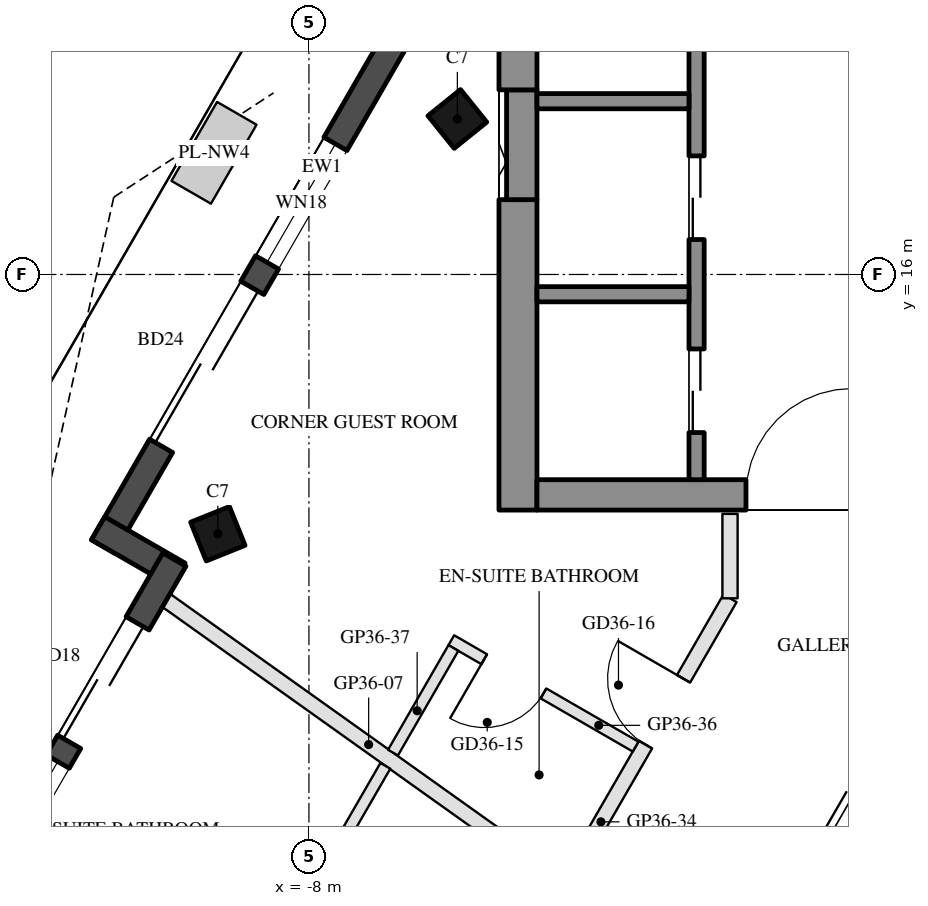
"""IFC4 building model, lengths in metres.
Left out: names, types, materials, properties, quantities, classifications, styles, units other than length and angle.
Written with IfcOpenShell. Run it as: python <this file> out.ifc"""

import sys

from ifc_helpers import new_model, si_unit, direction, frame, frame_2d, origin, origin_2d, place, context, subcontext, project, spatial, rectangle, hollow_rectangle, extrude, boolean, halfspace, element, fill, save


model = new_model("IFC4")
c1 = context("Model", 3, precision=1e-05, world=origin(), true_north=direction((0.0, 1.0)))
c2 = subcontext(c1, "Body", "Model", "MODEL_VIEW")
j1 = project(units=[si_unit("LENGTHUNIT", "METRE"), si_unit("PLANEANGLEUNIT", "RADIAN")], contexts=[c1])
p1 = place(None, origin())
s1 = spatial("IfcSite", under=j1, at=p1, CompositionType="ELEMENT")
p2 = place(p1, origin())
s2 = spatial("IfcBuilding", under=s1, at=p2, CompositionType="ELEMENT")
p3 = place(p2, frame((0.0, 0.0, 328.1)))
s3 = spatial("IfcBuildingStorey", under=s2, at=p3, CompositionType="ELEMENT", Elevation=328.1)
p4 = place(p3, frame((-6.047, 18.046, 0.0), z_axis=(0.069728397733, -0.180050765176, 0.981182792608), x_axis=(0.504276986778, 0.855013934028, 0.12106152661)))
e1 = element("IfcColumn", 1, at=p4, inside=s3, PredefinedType="COLUMN", context=c2, shape_type="SweptSolid", body=[
    boolean("DIFFERENCE", boolean("DIFFERENCE", extrude(hollow_rectangle(XDim=0.55, YDim=0.55, WallThickness=0.025, at=origin_2d()), origin(), (0.0, 0.0, 1.0), 3.771), halfspace(frame((0.0, 0.0, 0.04), z_axis=(0.0, 0.0, 1.0), x_axis=(1.0, 0.0, 0.0)), True)), halfspace(frame((0.0, 0.0, 3.753), z_axis=(0.0, 0.0, 1.0), x_axis=(1.0, 0.0, 0.0)), False)),
])
p5 = place(p3, frame((-9.198, 12.588, 0.0), z_axis=(0.100518021011, -0.128316722417, 0.98662604172), x_axis=(0.503129383785, 0.862065632243, 0.060857775822)))
e2 = element("IfcColumn", 2, at=p5, inside=s3, PredefinedType="COLUMN", context=c2, shape_type="SweptSolid", body=[
    boolean("DIFFERENCE", boolean("DIFFERENCE", extrude(hollow_rectangle(XDim=0.55, YDim=0.55, WallThickness=0.025, at=origin_2d()), origin(), (0.0, 0.0, 1.0), 3.75), halfspace(frame((0.0, 0.0, 0.034), z_axis=(0.0, 0.0, 1.0), x_axis=(1.0, 0.0, 0.0)), True)), halfspace(frame((0.0, 0.0, 3.735), z_axis=(0.0, 0.0, 1.0), x_axis=(1.0, 0.0, 0.0)), False)),
])
p6 = place(p3, frame((-5.905, 20.742, 0.0), z_axis=(0.0, 0.0, 1.0), x_axis=(-0.500003254449, -0.866023524819, 0.0)))
e3 = element("IfcWall", 3, at=p6, inside=s3, PredefinedType="SOLIDWALL", context=c2, shape_type="SweptSolid", body=[
    extrude(rectangle(XDim=9.608, YDim=0.35, at=frame_2d((4.804, 0.0))), origin(), (0.0, 0.0, 1.0), 3.45),
])
p7 = place(p6, frame((0.45, 0.0, 0.3)))
e4 = element("IfcOpeningElement", 4, at=p7, cuts=e3, PredefinedType="OPENING", context=c2, shape_type="SweptSolid", body=[
    extrude(rectangle(XDim=1.4, YDim=2.65, at=frame_2d((0.7, 1.325))), frame((0.0, 0.185, 0.0), z_axis=(0.0, -1.0, 0.0), x_axis=(1.0, 0.0, 0.0)), (0.0, 0.0, 1.0), 0.37),
])
p8 = place(p6, frame((5.68, 0.0, 0.0)))
e5 = element("IfcOpeningElement", 5, at=p8, cuts=e3, PredefinedType="OPENING", context=c2, shape_type="SweptSolid", body=[
    extrude(rectangle(XDim=2.4, YDim=2.4, at=frame_2d((1.2, 1.2))), frame((0.0, 0.185, 0.0), z_axis=(0.0, -1.0, 0.0), x_axis=(1.0, 0.0, 0.0)), (0.0, 0.0, 1.0), 0.37),
])
p9 = place(p6, frame((3.492, 0.0, 0.3)))
e6 = element("IfcOpeningElement", 6, at=p9, cuts=e3, PredefinedType="OPENING", context=c2, shape_type="SweptSolid", body=[
    extrude(rectangle(XDim=1.8, YDim=2.65, at=frame_2d((0.9, 1.325))), frame((0.0, 0.185, 0.0), z_axis=(0.0, -1.0, 0.0), x_axis=(1.0, 0.0, 0.0)), (0.0, 0.0, 1.0), 0.37),
])
p10 = place(p3, frame((-10.774, 12.66, 0.0), z_axis=(0.0, 0.0, 1.0), x_axis=(0.866142280446, -0.499797509021, 0.0)))
e7 = element("IfcWall", 7, at=p10, inside=s3, PredefinedType="SOLIDWALL", context=c2, shape_type="SweptSolid", body=[
    extrude(rectangle(XDim=1.22, YDim=0.35, at=frame_2d((0.61, 0.0))), origin(), (0.0, 0.0, 1.0), 3.45),
])
p11 = place(p3, frame((-9.77, 12.249, 0.0), z_axis=(0.0, 0.0, 1.0), x_axis=(-0.499999159329, -0.866025889145, 0.0)))
e8 = element("IfcWall", 8, at=p11, inside=s3, PredefinedType="SOLIDWALL", context=c2, shape_type="SweptSolid", body=[
    extrude(rectangle(XDim=5.143, YDim=0.35, at=frame_2d((2.571, 0.0))), origin(), (0.0, 0.0, 1.0), 3.45),
])
p12 = place(p11, frame((0.969, 0.0, 0.0)))
e9 = element("IfcOpeningElement", 9, at=p12, cuts=e8, PredefinedType="OPENING", context=c2, shape_type="SweptSolid", body=[
    extrude(rectangle(XDim=1.8, YDim=2.4, at=frame_2d((0.9, 1.2))), frame((0.0, 0.185, 0.0), z_axis=(0.0, -1.0, 0.0), x_axis=(1.0, 0.0, 0.0)), (0.0, 0.0, 1.0), 0.37),
])
p13 = place(p11, frame((3.069, 0.0, 0.3)))
e10 = element("IfcOpeningElement", 10, at=p13, cuts=e8, PredefinedType="OPENING", context=c2, shape_type="SweptSolid", body=[
    extrude(rectangle(XDim=1.7, YDim=2.65, at=frame_2d((0.85, 1.325))), frame((0.0, 0.185, 0.0), z_axis=(0.0, -1.0, 0.0), x_axis=(1.0, 0.0, 0.0)), (0.0, 0.0, 1.0), 0.37),
])
p14 = place(p3, frame((-5.25, 12.9, 0.0), z_axis=(0.0, 0.0, 1.0), x_axis=(0.0, 1.0, 0.0)))
e11 = element("IfcWall", 11, at=p14, inside=s3, PredefinedType="SHEAR", context=c2, shape_type="SweptSolid", body=[
    extrude(rectangle(XDim=4.085, YDim=0.5, at=frame_2d((2.042, 0.0))), origin(), (0.0, 0.0, 1.0), 3.45),
])
p15 = place(p3, frame((-5.2, 16.985, 0.0), z_axis=(0.0, 0.0, 1.0), x_axis=(0.0, 1.0, 0.0)))
e12 = element("IfcWall", 12, at=p15, inside=s3, PredefinedType="SHEAR", context=c2, shape_type="SweptSolid", body=[
    extrude(rectangle(XDim=1.445, YDim=0.4, at=frame_2d((0.722, 0.0))), origin(), (0.0, 0.0, 1.0), 3.45),
])
p16 = place(p3, frame((-5.25, 18.429, 0.0), z_axis=(0.0, 0.0, 1.0), x_axis=(0.0, 1.0, 0.0)))
e13 = element("IfcWall", 13, at=p16, inside=s3, PredefinedType="SHEAR", context=c2, shape_type="SweptSolid", body=[
    extrude(rectangle(XDim=2.738, YDim=0.5, at=frame_2d((1.369, 0.0))), origin(), (0.0, 0.0, 1.0), 3.45),
])
p17 = place(p3, frame((5.0, 13.1, 0.0), z_axis=(0.0, 0.0, 1.0), x_axis=(-1.0, 0.0, 0.0)))
e14 = element("IfcWall", 14, at=p17, inside=s3, PredefinedType="SHEAR", context=c2, shape_type="SweptSolid", body=[
    extrude(rectangle(XDim=10.0, YDim=0.4, at=frame_2d((5.0, 0.0))), origin(), (0.0, 0.0, 1.0), 3.45),
])
p18 = place(p17, frame((3.55, 0.0, 0.0)))
e15 = element("IfcOpeningElement", 15, at=p18, cuts=e14, PredefinedType="OPENING", context=c2, shape_type="SweptSolid", body=[
    extrude(rectangle(XDim=1.1, YDim=2.1, at=frame_2d((0.55, 1.05))), frame((0.0, 0.21, 0.0), z_axis=(0.0, -1.0, 0.0), x_axis=(1.0, 0.0, 0.0)), (0.0, 0.0, 1.0), 0.42),
])
p19 = place(p17, frame((5.85, 0.0, 0.0)))
e16 = element("IfcOpeningElement", 16, at=p19, cuts=e14, PredefinedType="OPENING", context=c2, shape_type="SweptSolid", body=[
    extrude(rectangle(XDim=1.4, YDim=2.1, at=frame_2d((0.7, 1.05))), frame((0.0, 0.21, 0.0), z_axis=(0.0, -1.0, 0.0), x_axis=(1.0, 0.0, 0.0)), (0.0, 0.0, 1.0), 0.42),
])
p20 = place(p3, frame((-2.9, 13.3, 0.0), z_axis=(0.0, 0.0, 1.0), x_axis=(0.0, 1.0, 0.0)))
e17 = element("IfcWall", 17, at=p20, inside=s3, PredefinedType="SHEAR", context=c2, shape_type="SweptSolid", body=[
    extrude(rectangle(XDim=9.273, YDim=0.2, at=frame_2d((4.636, 0.0))), origin(), (0.0, 0.0, 1.0), 3.45),
])
p21 = place(p20, frame((0.62, 0.0, 0.0)))
e18 = element("IfcOpeningElement", 18, at=p21, cuts=e17, PredefinedType="OPENING", context=c2, shape_type="SweptSolid", body=[
    extrude(rectangle(XDim=1.1, YDim=2.1, at=frame_2d((0.55, 1.05))), frame((0.0, 0.11, 0.0), z_axis=(0.0, -1.0, 0.0), x_axis=(1.0, 0.0, 0.0)), (0.0, 0.0, 1.0), 0.22),
])
p22 = place(p20, frame((3.16, 0.0, 0.0)))
e19 = element("IfcOpeningElement", 19, at=p22, cuts=e17, PredefinedType="OPENING", context=c2, shape_type="SweptSolid", body=[
    extrude(rectangle(XDim=1.1, YDim=2.1, at=frame_2d((0.55, 1.05))), frame((0.0, 0.11, 0.0), z_axis=(0.0, -1.0, 0.0), x_axis=(1.0, 0.0, 0.0)), (0.0, 0.0, 1.0), 0.22),
])
p23 = place(p20, frame((5.7, 0.0, 0.0)))
e20 = element("IfcOpeningElement", 20, at=p23, cuts=e17, PredefinedType="OPENING", context=c2, shape_type="SweptSolid", body=[
    extrude(rectangle(XDim=1.1, YDim=2.1, at=frame_2d((0.55, 1.05))), frame((0.0, 0.11, 0.0), z_axis=(0.0, -1.0, 0.0), x_axis=(1.0, 0.0, 0.0)), (0.0, 0.0, 1.0), 0.22),
])
for number, where, z_axis, x_axis in (
    (21, (-3.0, 15.74, 0.0), (0.0, 0.0, 1.0), (-1.0, 0.0, 0.0)),
    (22, (-3.0, 18.28, 0.0), (0.0, 0.0, 1.0), (-1.0, 0.0, 0.0)),
):
    element("IfcWall", number, at=place(p3, frame(where, z_axis=z_axis, x_axis=x_axis)), inside=s3, PredefinedType="SHEAR", context=c2, shape_type="SweptSolid", body=[
        extrude(rectangle(XDim=2.0, YDim=0.2, at=frame_2d((1.0, 0.0))), origin(), (0.0, 0.0, 1.0), 3.45),
    ])
p24 = place(p3, frame((-9.878, 11.712, 0.0), z_axis=(0.0, 0.0, 1.0), x_axis=(0.814431562196, -0.580259623357, 0.0)))
e23 = element("IfcWall", 23, at=p24, inside=s3, PredefinedType="PARTITIONING", context=c2, shape_type="SweptSolid", body=[
    extrude(rectangle(XDim=6.54, YDim=0.2, at=frame_2d((3.27, 0.0))), origin(), (0.0, 0.0, 1.0), 3.05),
])
p25 = place(p3, frame((-4.583, 8.062, 0.0), z_axis=(0.0, 0.0, 1.0), x_axis=(0.50000452617, 0.866022790583, 0.0)))
e24 = element("IfcWall", 24, at=p25, inside=s3, PredefinedType="PARTITIONING", context=c2, shape_type="SweptSolid", body=[
    extrude(rectangle(XDim=4.246, YDim=0.2, at=frame_2d((2.123, 0.0))), origin(), (0.0, 0.0, 1.0), 3.05),
])
p26 = place(p25, frame((2.023, 0.0, 0.0)))
e25 = element("IfcOpeningElement", 25, at=p26, cuts=e24, PredefinedType="OPENING", context=c2, shape_type="SweptSolid", body=[
    extrude(rectangle(XDim=1.0, YDim=2.1, at=frame_2d((0.5, 1.05))), frame((0.0, 0.11, 0.0), z_axis=(0.0, -1.0, 0.0), x_axis=(1.0, 0.0, 0.0)), (0.0, 0.0, 1.0), 0.22),
])
p27 = place(p3, frame((-2.46, 11.739, 0.0), z_axis=(0.0, 0.0, 1.0), x_axis=(0.0, 1.0, 0.0)))
e26 = element("IfcWall", 26, at=p27, inside=s3, PredefinedType="PARTITIONING", context=c2, shape_type="SweptSolid", body=[
    extrude(rectangle(XDim=1.111, YDim=0.2, at=frame_2d((0.555, 0.0))), origin(), (0.0, 0.0, 1.0), 3.45),
])
p28 = place(p3, frame((-3.702, 9.788, 0.0), z_axis=(0.0, 0.0, 1.0), x_axis=(-0.866034573852, 0.49998411664, 0.0)))
e27 = element("IfcWall", 27, at=p28, inside=s3, PredefinedType="PARTITIONING", context=c2, shape_type="SweptSolid", body=[
    extrude(rectangle(XDim=2.8, YDim=0.15, at=frame_2d((1.4, 0.0))), origin(), (0.0, 0.0, 1.0), 3.45),
])
p29 = place(p28, frame((1.4, 0.0, 0.0)))
e28 = element("IfcOpeningElement", 28, at=p29, cuts=e27, PredefinedType="OPENING", context=c2, shape_type="SweptSolid", body=[
    extrude(rectangle(XDim=0.9, YDim=2.1, at=frame_2d((0.45, 1.05))), frame((0.0, 0.085, 0.0), z_axis=(0.0, -1.0, 0.0), x_axis=(1.0, 0.0, 0.0)), (0.0, 0.0, 1.0), 0.17),
])
p30 = place(p3, frame((-6.1, 11.085, 0.0), z_axis=(0.0, 0.0, 1.0), x_axis=(-0.49987316553, -0.866098619317, 0.0)))
e29 = element("IfcWall", 29, at=p30, inside=s3, PredefinedType="PARTITIONING", context=c2, shape_type="SweptSolid", body=[
    extrude(rectangle(XDim=1.589, YDim=0.15, at=frame_2d((0.795, 0.0))), origin(), (0.0, 0.0, 1.0), 3.05),
])
p31 = place(p3, frame((-6.995, 9.535, 0.0), z_axis=(0.0, 0.0, 1.0), x_axis=(-0.499982754166, -0.866035360443, 0.0)))
e30 = element("IfcWall", 30, at=p31, inside=s3, PredefinedType="PARTITIONING", context=c2, shape_type="SweptSolid", body=[
    extrude(rectangle(XDim=2.111, YDim=0.15, at=frame_2d((1.055, 0.0))), origin(), (0.0, 0.0, 1.0), 3.05),
])
p32 = place(p8, frame((2.4, 0.0, 0.0), z_axis=(0.0, 0.0, 1.0), x_axis=(-1.0, 0.0, 0.0)))
e31 = element("IfcDoor", 31, at=p32, inside=s3, OperationType="SLIDING_TO_LEFT", PredefinedType="DOOR", context=c2, shape_type="SweptSolid", body=[
    extrude(rectangle(XDim=2.4, YDim=2.4, at=frame_2d((1.2, 1.2))), frame((0.0, 0.025, 0.0), z_axis=(0.0, -1.0, 0.0), x_axis=(1.0, 0.0, 0.0)), (0.0, 0.0, 1.0), 0.05),
])
fill(e5, e31)
p33 = place(p9, origin())
e32 = element("IfcWindow", 32, at=p33, inside=s3, PartitioningType="SINGLE_PANEL", PredefinedType="WINDOW", context=c2, shape_type="SweptSolid", body=[
    extrude(rectangle(XDim=1.8, YDim=2.65, at=frame_2d((0.9, 1.325))), frame((0.0, 0.03, 0.0), z_axis=(0.0, -1.0, 0.0), x_axis=(1.0, 0.0, 0.0)), (0.0, 0.0, 1.0), 0.06),
])
fill(e6, e32)
p34 = place(p12, frame((1.8, 0.0, 0.0), z_axis=(0.0, 0.0, 1.0), x_axis=(-1.0, 0.0, 0.0)))
e33 = element("IfcDoor", 33, at=p34, inside=s3, OperationType="SLIDING_TO_LEFT", PredefinedType="DOOR", context=c2, shape_type="SweptSolid", body=[
    extrude(rectangle(XDim=1.8, YDim=2.4, at=frame_2d((0.9, 1.2))), frame((0.0, 0.025, 0.0), z_axis=(0.0, -1.0, 0.0), x_axis=(1.0, 0.0, 0.0)), (0.0, 0.0, 1.0), 0.05),
])
fill(e9, e33)
p35 = place(p13, origin())
e34 = element("IfcWindow", 34, at=p35, inside=s3, PartitioningType="SINGLE_PANEL", PredefinedType="WINDOW", context=c2, shape_type="SweptSolid", body=[
    extrude(rectangle(XDim=1.7, YDim=2.65, at=frame_2d((0.85, 1.325))), frame((0.0, 0.03, 0.0), z_axis=(0.0, -1.0, 0.0), x_axis=(1.0, 0.0, 0.0)), (0.0, 0.0, 1.0), 0.06),
])
fill(e10, e34)
p36 = place(p21, origin())
e35 = element("IfcDoor", 35, at=p36, inside=s3, OperationType="DOUBLE_DOOR_SLIDING", PredefinedType="DOOR", context=c2, shape_type="SweptSolid", body=[
    extrude(rectangle(XDim=1.1, YDim=2.1, at=frame_2d((0.55, 1.05))), frame((0.0, 0.025, 0.0), z_axis=(0.0, -1.0, 0.0), x_axis=(1.0, 0.0, 0.0)), (0.0, 0.0, 1.0), 0.05),
])
fill(e18, e35)
p37 = place(p22, origin())
e36 = element("IfcDoor", 36, at=p37, inside=s3, OperationType="DOUBLE_DOOR_SLIDING", PredefinedType="DOOR", context=c2, shape_type="SweptSolid", body=[
    extrude(rectangle(XDim=1.1, YDim=2.1, at=frame_2d((0.55, 1.05))), frame((0.0, 0.025, 0.0), z_axis=(0.0, -1.0, 0.0), x_axis=(1.0, 0.0, 0.0)), (0.0, 0.0, 1.0), 0.05),
])
fill(e19, e36)
p38 = place(p19, frame((1.4, 0.0, 0.0), z_axis=(0.0, 0.0, 1.0), x_axis=(-1.0, 0.0, 0.0)))
e37 = element("IfcDoor", 37, at=p38, inside=s3, OperationType="DOUBLE_DOOR_SINGLE_SWING", PredefinedType="DOOR", context=c2, shape_type="SweptSolid", body=[
    extrude(rectangle(XDim=1.4, YDim=2.1, at=frame_2d((0.7, 1.05))), frame((0.0, 0.025, 0.0), z_axis=(0.0, -1.0, 0.0), x_axis=(1.0, 0.0, 0.0)), (0.0, 0.0, 1.0), 0.05),
])
fill(e16, e37)
p39 = place(p29, origin())
e38 = element("IfcDoor", 38, at=p39, inside=s3, OperationType="SINGLE_SWING_RIGHT", PredefinedType="DOOR", context=c2, shape_type="SweptSolid", body=[
    extrude(rectangle(XDim=0.9, YDim=2.1, at=frame_2d((0.45, 1.05))), frame((0.0, 0.025, 0.0), z_axis=(0.0, -1.0, 0.0), x_axis=(1.0, 0.0, 0.0)), (0.0, 0.0, 1.0), 0.05),
])
fill(e28, e38)
p40 = place(p26, origin())
e39 = element("IfcDoor", 39, at=p40, inside=s3, OperationType="SINGLE_SWING_RIGHT", PredefinedType="DOOR", context=c2, shape_type="SweptSolid", body=[
    extrude(rectangle(XDim=1.0, YDim=2.1, at=frame_2d((0.5, 1.05))), frame((0.0, 0.025, 0.0), z_axis=(0.0, -1.0, 0.0), x_axis=(1.0, 0.0, 0.0)), (0.0, 0.0, 1.0), 0.05),
])
fill(e25, e39)
save(model, sys.argv[1])
